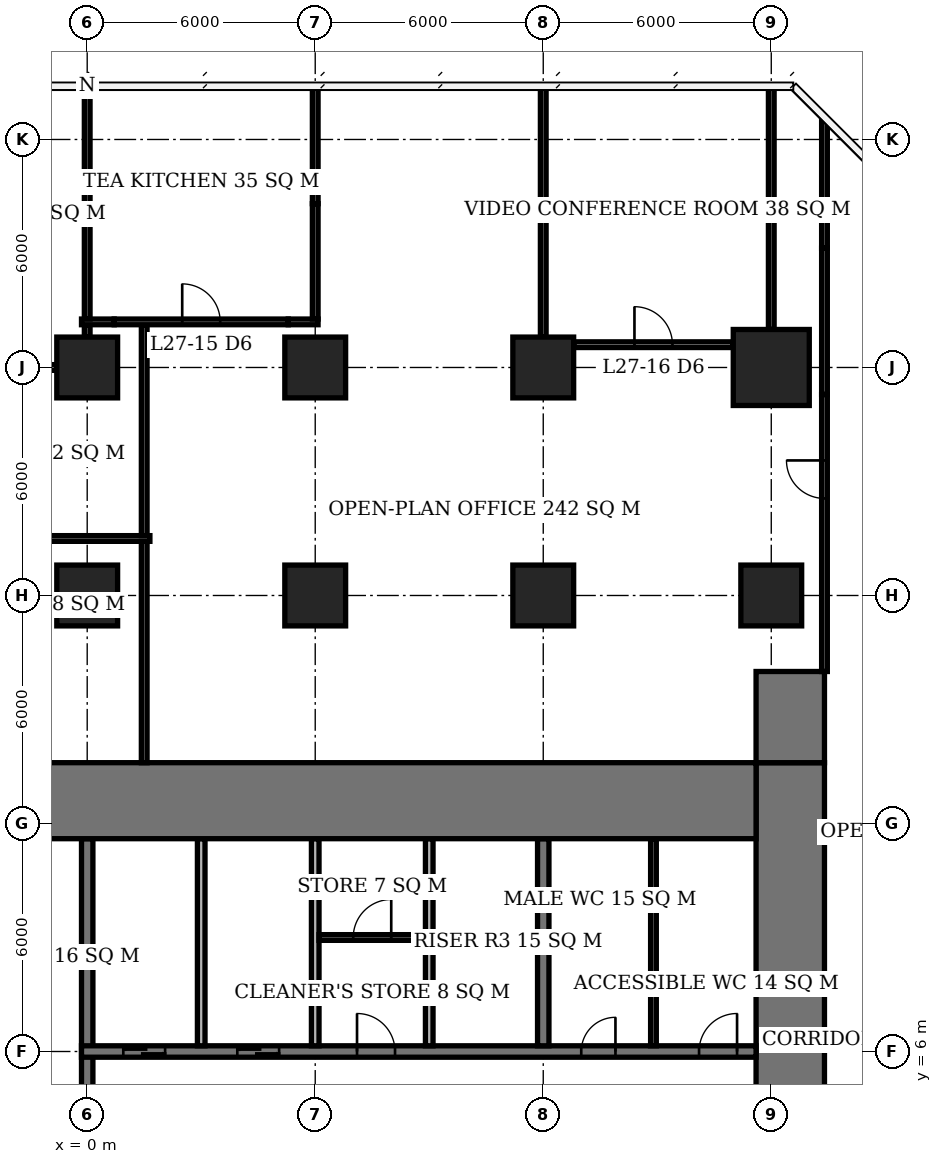
"""IFC4 building model, lengths in metres.
Left out: names, types, materials, properties, quantities, classifications, styles, units other than length and angle.
Written with IfcOpenShell. Run it as: python <this file> out.ifc"""

import sys

from ifc_helpers import new_model, si_unit, direction, frame, frame_2d, origin, origin_2d, place, context, subcontext, project, spatial, rectangle, extrude, element, fill, save


model = new_model("IFC4")
c1 = context("Model", 3, precision=1e-05, world=origin(), true_north=direction((0.0, 1.0)))
c2 = subcontext(c1, "Body", "Model", "MODEL_VIEW")
j1 = project(units=[si_unit("LENGTHUNIT", "METRE"), si_unit("PLANEANGLEUNIT", "RADIAN")], contexts=[c1])
p1 = place(None, origin())
s1 = spatial("IfcSite", under=j1, at=p1, CompositionType="ELEMENT")
p2 = place(p1, origin())
s2 = spatial("IfcBuilding", under=s1, at=p2, CompositionType="ELEMENT")
p3 = place(p2, frame((0.0, 0.0, 113.3)))
s3 = spatial("IfcBuildingStorey", under=s2, at=p3, CompositionType="ELEMENT", Elevation=113.3)
for number, where, z_axis, x_axis in (
    (1, (0.0, 18.0, 0.0), (0.0, 0.0, 1.0), (1.0, 0.0, 0.0)),
    (2, (0.0, 24.0, 0.0), (0.0, 0.0, 1.0), (1.0, 0.0, 0.0)),
    (3, (6.0, 18.0, 0.0), (0.0, 0.0, 1.0), (1.0, 0.0, 0.0)),
    (4, (6.0, 24.0, 0.0), (0.0, 0.0, 1.0), (1.0, 0.0, 0.0)),
    (5, (12.0, 18.0, 0.0), (0.0, 0.0, 1.0), (1.0, 0.0, 0.0)),
    (6, (12.0, 24.0, 0.0), (0.0, 0.0, 1.0), (1.0, 0.0, 0.0)),
    (7, (18.0, 18.0, 0.0), (0.0, 0.0, 1.0), (1.0, 0.0, 0.0)),
):
    element("IfcColumn", number, at=place(p3, frame(where, z_axis=z_axis, x_axis=x_axis)), inside=s3, PredefinedType="COLUMN", context=c2, shape_type="SweptSolid", body=[
        extrude(rectangle(XDim=1.6, YDim=1.6, at=origin_2d()), origin(), (0.0, 0.0, 1.0), 3.9),
    ])
p4 = place(p3, frame((18.0, 24.0, 0.0), z_axis=(0.0, 0.0, 1.0), x_axis=(1.0, 0.0, 0.0)))
e8 = element("IfcColumn", 8, at=p4, inside=s3, PredefinedType="COLUMN", context=c2, shape_type="SweptSolid", body=[
    extrude(rectangle(XDim=2.0, YDim=2.0, at=origin_2d()), origin(), (0.0, 0.0, 1.0), 3.9),
])
p5 = place(p3, frame((-5.6, 12.6, 0.0), z_axis=(0.0, 0.0, 1.0), x_axis=(1.0, 0.0, 0.0)))
e9 = element("IfcWall", 9, at=p5, inside=s3, PredefinedType="SHEAR", context=c2, shape_type="SweptSolid", body=[
    extrude(rectangle(XDim=23.2, YDim=2.0, at=frame_2d((11.6, 0.0))), origin(), (0.0, 0.0, 1.0), 3.9),
])
p6 = place(p3, frame((18.5, -7.6, 0.0), z_axis=(0.0, 0.0, 1.0), x_axis=(0.0, 1.0, 0.0)))
e10 = element("IfcWall", 10, at=p6, inside=s3, PredefinedType="SHEAR", context=c2, shape_type="SweptSolid", body=[
    extrude(rectangle(XDim=21.2, YDim=1.8, at=frame_2d((10.6, 0.0))), origin(), (0.0, 0.0, 1.0), 3.9),
])
p7 = place(p6, frame((9.2, 0.0, 0.0)))
e11 = element("IfcOpeningElement", 11, at=p7, cuts=e10, PredefinedType="OPENING", context=c2, shape_type="SweptSolid", body=[
    extrude(rectangle(XDim=1.8, YDim=2.4, at=frame_2d((0.9, 1.2))), frame((0.0, 0.91, 0.0), z_axis=(0.0, -1.0, 0.0), x_axis=(1.0, 0.0, 0.0)), (0.0, 0.0, 1.0), 1.82),
])
p8 = place(p3, frame((18.5, 13.6, 0.0), z_axis=(0.0, 0.0, 1.0), x_axis=(0.0, 1.0, 0.0)))
e12 = element("IfcWall", 12, at=p8, inside=s3, PredefinedType="SHEAR", context=c2, shape_type="SweptSolid", body=[
    extrude(rectangle(XDim=2.4, YDim=1.8, at=frame_2d((1.2, 0.0))), origin(), (0.0, 0.0, 1.0), 3.9),
])
p9 = place(p3, frame((-0.15, 6.0, 0.0), z_axis=(0.0, 0.0, 1.0), x_axis=(1.0, 0.0, 0.0)))
e13 = element("IfcWall", 13, at=p9, inside=s3, PredefinedType="SHEAR", context=c2, shape_type="SweptSolid", body=[
    extrude(rectangle(XDim=17.75, YDim=0.3, at=frame_2d((8.875, 0.0))), origin(), (0.0, 0.0, 1.0), 3.9),
])
p10 = place(p9, frame((13.15, 0.0, 0.0)))
e14 = element("IfcOpeningElement", 14, at=p10, cuts=e13, PredefinedType="OPENING", context=c2, shape_type="SweptSolid", body=[
    extrude(rectangle(XDim=0.9, YDim=2.1, at=frame_2d((0.45, 1.05))), frame((0.0, 0.16, 0.0), z_axis=(0.0, -1.0, 0.0), x_axis=(1.0, 0.0, 0.0)), (0.0, 0.0, 1.0), 0.32),
])
p11 = place(p9, frame((16.25, 0.0, 0.0)))
e15 = element("IfcOpeningElement", 15, at=p11, cuts=e13, PredefinedType="OPENING", context=c2, shape_type="SweptSolid", body=[
    extrude(rectangle(XDim=1.0, YDim=2.1, at=frame_2d((0.5, 1.05))), frame((0.0, 0.16, 0.0), z_axis=(0.0, -1.0, 0.0), x_axis=(1.0, 0.0, 0.0)), (0.0, 0.0, 1.0), 0.32),
])
p12 = place(p9, frame((7.25, 0.0, 0.0)))
e16 = element("IfcOpeningElement", 16, at=p12, cuts=e13, PredefinedType="OPENING", context=c2, shape_type="SweptSolid", body=[
    extrude(rectangle(XDim=1.0, YDim=2.1, at=frame_2d((0.5, 1.05))), frame((0.0, 0.16, 0.0), z_axis=(0.0, -1.0, 0.0), x_axis=(1.0, 0.0, 0.0)), (0.0, 0.0, 1.0), 0.32),
])
p13 = place(p9, frame((1.1, 0.0, 0.0)))
e17 = element("IfcOpeningElement", 17, at=p13, cuts=e13, PredefinedType="OPENING", context=c2, shape_type="SweptSolid", body=[
    extrude(rectangle(XDim=1.1, YDim=2.1, at=frame_2d((0.55, 1.05))), frame((0.0, 0.16, 0.0), z_axis=(0.0, -1.0, 0.0), x_axis=(1.0, 0.0, 0.0)), (0.0, 0.0, 1.0), 0.32),
])
p14 = place(p9, frame((4.1, 0.0, 0.0)))
e18 = element("IfcOpeningElement", 18, at=p14, cuts=e13, PredefinedType="OPENING", context=c2, shape_type="SweptSolid", body=[
    extrude(rectangle(XDim=1.1, YDim=2.1, at=frame_2d((0.55, 1.05))), frame((0.0, 0.16, 0.0), z_axis=(0.0, -1.0, 0.0), x_axis=(1.0, 0.0, 0.0)), (0.0, 0.0, 1.0), 0.32),
])
p15 = place(p3, frame((0.0, 3.15, 0.0), z_axis=(0.0, 0.0, 1.0), x_axis=(0.0, 1.0, 0.0)))
e19 = element("IfcWall", 19, at=p15, inside=s3, PredefinedType="SHEAR", context=c2, shape_type="SweptSolid", body=[
    extrude(rectangle(XDim=8.45, YDim=0.3, at=frame_2d((4.225, 0.0))), origin(), (0.0, 0.0, 1.0), 3.9),
])
p16 = place(p3, frame((12.0, 6.15, 0.0), z_axis=(0.0, 0.0, 1.0), x_axis=(0.0, 1.0, 0.0)))
e20 = element("IfcWall", 20, at=p16, inside=s3, PredefinedType="SHEAR", context=c2, shape_type="SweptSolid", body=[
    extrude(rectangle(XDim=5.45, YDim=0.3, at=frame_2d((2.725, 0.0))), origin(), (0.0, 0.0, 1.0), 3.9),
])
for number, where, z_axis, x_axis in (
    (21, (3.0, 6.15, 0.0), (0.0, 0.0, 1.0), (0.0, 1.0, 0.0)),
    (22, (6.0, 6.15, 0.0), (0.0, 0.0, 1.0), (0.0, 1.0, 0.0)),
    (23, (9.0, 6.15, 0.0), (0.0, 0.0, 1.0), (0.0, 1.0, 0.0)),
):
    element("IfcWall", number, at=place(p3, frame(where, z_axis=z_axis, x_axis=x_axis)), inside=s3, PredefinedType="SOLIDWALL", context=c2, shape_type="SweptSolid", body=[
        extrude(rectangle(XDim=5.45, YDim=0.2, at=frame_2d((2.725, 0.0))), origin(), (0.0, 0.0, 1.0), 3.9),
    ])
p17 = place(p3, frame((14.9, 6.15, 0.0), z_axis=(0.0, 0.0, 1.0), x_axis=(0.0, 1.0, 0.0)))
e24 = element("IfcWall", 24, at=p17, inside=s3, PredefinedType="PLUMBINGWALL", context=c2, shape_type="SweptSolid", body=[
    extrude(rectangle(XDim=5.45, YDim=0.15, at=frame_2d((2.725, 0.0))), origin(), (0.0, 0.0, 1.0), 3.65),
])
p18 = place(p3, frame((6.1, 9.0, 0.0), z_axis=(0.0, 0.0, 1.0), x_axis=(1.0, 0.0, 0.0)))
e25 = element("IfcWall", 25, at=p18, inside=s3, PredefinedType="PARTITIONING", context=c2, shape_type="SweptSolid", body=[
    extrude(rectangle(XDim=2.8, YDim=0.15, at=frame_2d((1.4, 0.0))), origin(), (0.0, 0.0, 1.0), 3.65),
])
p19 = place(p18, frame((0.9, 0.0, 0.0)))
e26 = element("IfcOpeningElement", 26, at=p19, cuts=e25, PredefinedType="OPENING", context=c2, shape_type="SweptSolid", body=[
    extrude(rectangle(XDim=1.0, YDim=2.1, at=frame_2d((0.5, 1.05))), frame((0.0, 0.085, 0.0), z_axis=(0.0, -1.0, 0.0), x_axis=(1.0, 0.0, 0.0)), (0.0, 0.0, 1.0), 0.17),
])
p20 = place(p3, frame((-5.2, 24.0, 0.0), z_axis=(0.0, 0.0, 1.0), x_axis=(1.0, 0.0, 0.0)))
e27 = element("IfcWall", 27, at=p20, inside=s3, PredefinedType="PARTITIONING", context=c2, shape_type="SweptSolid", body=[
    extrude(rectangle(XDim=4.4, YDim=0.15, at=frame_2d((2.2, 0.0))), origin(), (0.0, 0.0, 1.0), 3.65),
])
p21 = place(p20, frame((1.7, 0.0, 0.0)))
e28 = element("IfcOpeningElement", 28, at=p21, cuts=e27, PredefinedType="OPENING", context=c2, shape_type="SweptSolid", body=[
    extrude(rectangle(XDim=1.0, YDim=2.1, at=frame_2d((0.5, 1.05))), frame((0.0, 0.085, 0.0), z_axis=(0.0, -1.0, 0.0), x_axis=(1.0, 0.0, 0.0)), (0.0, 0.0, 1.0), 0.17),
])
p22 = place(p3, frame((12.8, 24.6, 0.0), z_axis=(0.0, 0.0, 1.0), x_axis=(1.0, 0.0, 0.0)))
e29 = element("IfcWall", 29, at=p22, inside=s3, PredefinedType="PARTITIONING", context=c2, shape_type="SweptSolid", body=[
    extrude(rectangle(XDim=4.2, YDim=0.15, at=frame_2d((2.1, 0.0))), origin(), (0.0, 0.0, 1.0), 3.65),
])
p23 = place(p22, frame((1.6, 0.0, 0.0)))
e30 = element("IfcOpeningElement", 30, at=p23, cuts=e29, PredefinedType="OPENING", context=c2, shape_type="SweptSolid", body=[
    extrude(rectangle(XDim=1.0, YDim=2.1, at=frame_2d((0.5, 1.05))), frame((0.0, 0.085, 0.0), z_axis=(0.0, -1.0, 0.0), x_axis=(1.0, 0.0, 0.0)), (0.0, 0.0, 1.0), 0.17),
])
p24 = place(p3, frame((-0.15, 25.2, 0.0), z_axis=(0.0, 0.0, 1.0), x_axis=(1.0, 0.0, 0.0)))
e31 = element("IfcWall", 31, at=p24, inside=s3, PredefinedType="PARTITIONING", context=c2, shape_type="SweptSolid", body=[
    extrude(rectangle(XDim=0.86, YDim=0.15, at=frame_2d((0.43, 0.0))), origin(), (0.0, 0.0, 1.0), 2.65),
])
p25 = place(p3, frame((0.71, 25.2, 0.0), z_axis=(0.0, 0.0, 1.0), x_axis=(1.0, 0.0, 0.0)))
e32 = element("IfcWall", 32, at=p25, inside=s3, PredefinedType="PARTITIONING", context=c2, shape_type="SweptSolid", body=[
    extrude(rectangle(XDim=4.58, YDim=0.15, at=frame_2d((2.29, 0.0))), origin(), (0.0, 0.0, 1.0), 3.65),
])
p26 = place(p25, frame((1.79, 0.0, 0.0)))
e33 = element("IfcOpeningElement", 33, at=p26, cuts=e32, PredefinedType="OPENING", context=c2, shape_type="SweptSolid", body=[
    extrude(rectangle(XDim=1.0, YDim=2.1, at=frame_2d((0.5, 1.05))), frame((0.0, 0.085, 0.0), z_axis=(0.0, -1.0, 0.0), x_axis=(1.0, 0.0, 0.0)), (0.0, 0.0, 1.0), 0.17),
])
p27 = place(p3, frame((5.29, 25.2, 0.0), z_axis=(0.0, 0.0, 1.0), x_axis=(1.0, 0.0, 0.0)))
e34 = element("IfcWall", 34, at=p27, inside=s3, PredefinedType="PARTITIONING", context=c2, shape_type="SweptSolid", body=[
    extrude(rectangle(XDim=0.785, YDim=0.15, at=frame_2d((0.393, 0.0))), origin(), (0.0, 0.0, 1.0), 2.65),
])
p28 = place(p3, frame((0.0, 24.8, 0.0), z_axis=(0.0, 0.0, 1.0), x_axis=(0.0, 1.0, 0.0)))
e35 = element("IfcWall", 35, at=p28, inside=s3, PredefinedType="PARTITIONING", context=c2, shape_type="SweptSolid", body=[
    extrude(rectangle(XDim=0.325, YDim=0.15, at=frame_2d((0.163, 0.0))), origin(), (0.0, 0.0, 1.0), 2.65),
])
p29 = place(p3, frame((0.0, 25.275, 0.0), z_axis=(0.0, 0.0, 1.0), x_axis=(0.0, 1.0, 0.0)))
e36 = element("IfcWall", 36, at=p29, inside=s3, PredefinedType="PARTITIONING", context=c2, shape_type="SweptSolid", body=[
    extrude(rectangle(XDim=3.035, YDim=0.15, at=frame_2d((1.518, 0.0))), origin(), (0.0, 0.0, 1.0), 2.65),
])
p30 = place(p3, frame((0.0, 28.31, 0.0), z_axis=(0.0, 0.0, 1.0), x_axis=(0.0, 1.0, 0.0)))
e37 = element("IfcWall", 37, at=p30, inside=s3, PredefinedType="PARTITIONING", context=c2, shape_type="SweptSolid", body=[
    extrude(rectangle(XDim=3.04, YDim=0.15, at=frame_2d((1.52, 0.0))), origin(), (0.0, 0.0, 1.0), 3.65),
])
p31 = place(p3, frame((6.0, 25.275, 0.0), z_axis=(0.0, 0.0, 1.0), x_axis=(0.0, 1.0, 0.0)))
e38 = element("IfcWall", 38, at=p31, inside=s3, PredefinedType="PARTITIONING", context=c2, shape_type="SweptSolid", body=[
    extrude(rectangle(XDim=3.035, YDim=0.15, at=frame_2d((1.518, 0.0))), origin(), (0.0, 0.0, 1.0), 2.65),
])
p32 = place(p3, frame((6.0, 28.31, 0.0), z_axis=(0.0, 0.0, 1.0), x_axis=(0.0, 1.0, 0.0)))
e39 = element("IfcWall", 39, at=p32, inside=s3, PredefinedType="PARTITIONING", context=c2, shape_type="SweptSolid", body=[
    extrude(rectangle(XDim=3.09, YDim=0.15, at=frame_2d((1.545, 0.0))), origin(), (0.0, 0.0, 1.0), 3.65),
])
p33 = place(p3, frame((12.0, 24.8, 0.0), z_axis=(0.0, 0.0, 1.0), x_axis=(0.0, 1.0, 0.0)))
e40 = element("IfcWall", 40, at=p33, inside=s3, PredefinedType="PARTITIONING", context=c2, shape_type="SweptSolid", body=[
    extrude(rectangle(XDim=3.51, YDim=0.15, at=frame_2d((1.755, 0.0))), origin(), (0.0, 0.0, 1.0), 2.65),
])
p34 = place(p3, frame((12.0, 28.31, 0.0), z_axis=(0.0, 0.0, 1.0), x_axis=(0.0, 1.0, 0.0)))
e41 = element("IfcWall", 41, at=p34, inside=s3, PredefinedType="PARTITIONING", context=c2, shape_type="SweptSolid", body=[
    extrude(rectangle(XDim=3.09, YDim=0.15, at=frame_2d((1.545, 0.0))), origin(), (0.0, 0.0, 1.0), 3.65),
])
p35 = place(p3, frame((18.0, 25.0, 0.0), z_axis=(0.0, 0.0, 1.0), x_axis=(0.0, 1.0, 0.0)))
e42 = element("IfcWall", 42, at=p35, inside=s3, PredefinedType="PARTITIONING", context=c2, shape_type="SweptSolid", body=[
    extrude(rectangle(XDim=3.31, YDim=0.15, at=frame_2d((1.655, 0.0))), origin(), (0.0, 0.0, 1.0), 2.65),
])
p36 = place(p3, frame((18.0, 28.31, 0.0), z_axis=(0.0, 0.0, 1.0), x_axis=(0.0, 1.0, 0.0)))
e43 = element("IfcWall", 43, at=p36, inside=s3, PredefinedType="PARTITIONING", context=c2, shape_type="SweptSolid", body=[
    extrude(rectangle(XDim=3.09, YDim=0.15, at=frame_2d((1.545, 0.0))), origin(), (0.0, 0.0, 1.0), 3.65),
])
p37 = place(p3, frame((-7.55, 19.5, 0.0), z_axis=(0.0, 0.0, 1.0), x_axis=(1.0, 0.0, 0.0)))
e44 = element("IfcWall", 44, at=p37, inside=s3, PredefinedType="PARTITIONING", context=c2, shape_type="SweptSolid", body=[
    extrude(rectangle(XDim=9.2, YDim=0.15, at=frame_2d((4.6, 0.0))), origin(), (0.0, 0.0, 1.0), 3.65),
])
p38 = place(p3, frame((1.5, 13.6, 0.0), z_axis=(0.0, 0.0, 1.0), x_axis=(0.0, 1.0, 0.0)))
e45 = element("IfcWall", 45, at=p38, inside=s3, PredefinedType="PARTITIONING", context=c2, shape_type="SweptSolid", body=[
    extrude(rectangle(XDim=5.825, YDim=0.15, at=frame_2d((2.913, 0.0))), origin(), (0.0, 0.0, 1.0), 3.65),
])
p39 = place(p3, frame((1.5, 19.575, 0.0), z_axis=(0.0, 0.0, 1.0), x_axis=(0.0, 1.0, 0.0)))
e46 = element("IfcWall", 46, at=p39, inside=s3, PredefinedType="PARTITIONING", context=c2, shape_type="SweptSolid", body=[
    extrude(rectangle(XDim=5.55, YDim=0.15, at=frame_2d((2.775, 0.0))), origin(), (0.0, 0.0, 1.0), 3.65),
])
p40 = place(p3, frame((19.4, 16.0, 0.0), z_axis=(0.0, 0.0, 1.0), x_axis=(0.0, 1.0, 0.0)))
e47 = element("IfcWall", 47, at=p40, inside=s3, PredefinedType="PARTITIONING", context=c2, shape_type="SweptSolid", body=[
    extrude(rectangle(XDim=7.29, YDim=0.15, at=frame_2d((3.645, 0.0))), origin(), (0.0, 0.0, 1.0), 3.65),
])
p41 = place(p40, frame((4.554, 0.0, 0.0)))
e48 = element("IfcOpeningElement", 48, at=p41, cuts=e47, PredefinedType="OPENING", context=c2, shape_type="SweptSolid", body=[
    extrude(rectangle(XDim=1.0, YDim=2.1, at=frame_2d((0.5, 1.05))), frame((0.0, 0.085, 0.0), z_axis=(0.0, -1.0, 0.0), x_axis=(1.0, 0.0, 0.0)), (0.0, 0.0, 1.0), 0.17),
])
p42 = place(p3, frame((19.4, 23.29, 0.0), z_axis=(0.0, 0.0, 1.0), x_axis=(0.0, 1.0, 0.0)))
e49 = element("IfcWall", 49, at=p42, inside=s3, PredefinedType="PARTITIONING", context=c2, shape_type="SweptSolid", body=[
    extrude(rectangle(XDim=3.85, YDim=0.15, at=frame_2d((1.925, 0.0))), origin(), (0.0, 0.0, 1.0), 2.65),
])
p43 = place(p3, frame((19.4, 27.14, 0.0), z_axis=(0.0, 0.0, 1.0), x_axis=(0.0, 1.0, 0.0)))
e50 = element("IfcWall", 50, at=p43, inside=s3, PredefinedType="PARTITIONING", context=c2, shape_type="SweptSolid", body=[
    extrude(rectangle(XDim=3.349, YDim=0.15, at=frame_2d((1.675, 0.0))), origin(), (0.0, 0.0, 1.0), 3.65),
])
p44 = place(p10, origin())
e51 = element("IfcDoor", 51, at=p44, inside=s3, OperationType="SINGLE_SWING_RIGHT", PredefinedType="DOOR", context=c2, shape_type="SweptSolid", body=[
    extrude(rectangle(XDim=0.9, YDim=2.1, at=frame_2d((0.45, 1.05))), frame((0.0, 0.025, 0.0), z_axis=(0.0, -1.0, 0.0), x_axis=(1.0, 0.0, 0.0)), (0.0, 0.0, 1.0), 0.05),
])
fill(e14, e51)
p45 = place(p11, origin())
e52 = element("IfcDoor", 52, at=p45, inside=s3, OperationType="SINGLE_SWING_RIGHT", PredefinedType="DOOR", context=c2, shape_type="SweptSolid", body=[
    extrude(rectangle(XDim=1.0, YDim=2.1, at=frame_2d((0.5, 1.05))), frame((0.0, 0.025, 0.0), z_axis=(0.0, -1.0, 0.0), x_axis=(1.0, 0.0, 0.0)), (0.0, 0.0, 1.0), 0.05),
])
fill(e15, e52)
p46 = place(p19, origin())
e53 = element("IfcDoor", 53, at=p46, inside=s3, OperationType="SINGLE_SWING_RIGHT", PredefinedType="DOOR", context=c2, shape_type="SweptSolid", body=[
    extrude(rectangle(XDim=1.0, YDim=2.1, at=frame_2d((0.5, 1.05))), frame((0.0, 0.025, 0.0), z_axis=(0.0, -1.0, 0.0), x_axis=(1.0, 0.0, 0.0)), (0.0, 0.0, 1.0), 0.05),
])
fill(e26, e53)
p47 = place(p12, origin())
e54 = element("IfcDoor", 54, at=p47, inside=s3, OperationType="SINGLE_SWING_LEFT", PredefinedType="DOOR", context=c2, shape_type="SweptSolid", body=[
    extrude(rectangle(XDim=1.0, YDim=2.1, at=frame_2d((0.5, 1.05))), frame((0.0, 0.025, 0.0), z_axis=(0.0, -1.0, 0.0), x_axis=(1.0, 0.0, 0.0)), (0.0, 0.0, 1.0), 0.05),
])
fill(e16, e54)
p48 = place(p13, origin())
e55 = element("IfcDoor", 55, at=p48, inside=s3, OperationType="DOUBLE_DOOR_SLIDING", PredefinedType="USERDEFINED", context=c2, shape_type="SweptSolid", body=[
    extrude(rectangle(XDim=1.1, YDim=2.1, at=frame_2d((0.55, 1.05))), frame((0.0, 0.025, 0.0), z_axis=(0.0, -1.0, 0.0), x_axis=(1.0, 0.0, 0.0)), (0.0, 0.0, 1.0), 0.05),
])
fill(e17, e55)
p49 = place(p14, origin())
e56 = element("IfcDoor", 56, at=p49, inside=s3, OperationType="DOUBLE_DOOR_SLIDING", PredefinedType="USERDEFINED", context=c2, shape_type="SweptSolid", body=[
    extrude(rectangle(XDim=1.1, YDim=2.1, at=frame_2d((0.55, 1.05))), frame((0.0, 0.025, 0.0), z_axis=(0.0, -1.0, 0.0), x_axis=(1.0, 0.0, 0.0)), (0.0, 0.0, 1.0), 0.05),
])
fill(e18, e56)
p50 = place(p26, origin())
e57 = element("IfcDoor", 57, at=p50, inside=s3, OperationType="SINGLE_SWING_LEFT", PredefinedType="DOOR", context=c2, shape_type="SweptSolid", body=[
    extrude(rectangle(XDim=1.0, YDim=2.1, at=frame_2d((0.5, 1.05))), frame((0.0, 0.025, 0.0), z_axis=(0.0, -1.0, 0.0), x_axis=(1.0, 0.0, 0.0)), (0.0, 0.0, 1.0), 0.05),
])
fill(e33, e57)
p51 = place(p23, origin())
e58 = element("IfcDoor", 58, at=p51, inside=s3, OperationType="SINGLE_SWING_LEFT", PredefinedType="DOOR", context=c2, shape_type="SweptSolid", body=[
    extrude(rectangle(XDim=1.0, YDim=2.1, at=frame_2d((0.5, 1.05))), frame((0.0, 0.025, 0.0), z_axis=(0.0, -1.0, 0.0), x_axis=(1.0, 0.0, 0.0)), (0.0, 0.0, 1.0), 0.05),
])
fill(e30, e58)
p52 = place(p41, origin())
e59 = element("IfcDoor", 59, at=p52, inside=s3, OperationType="SINGLE_SWING_RIGHT", PredefinedType="DOOR", context=c2, shape_type="SweptSolid", body=[
    extrude(rectangle(XDim=1.0, YDim=2.1, at=frame_2d((0.5, 1.05))), frame((0.0, 0.025, 0.0), z_axis=(0.0, -1.0, 0.0), x_axis=(1.0, 0.0, 0.0)), (0.0, 0.0, 1.0), 0.05),
])
fill(e48, e59)
save(model, sys.argv[1])
